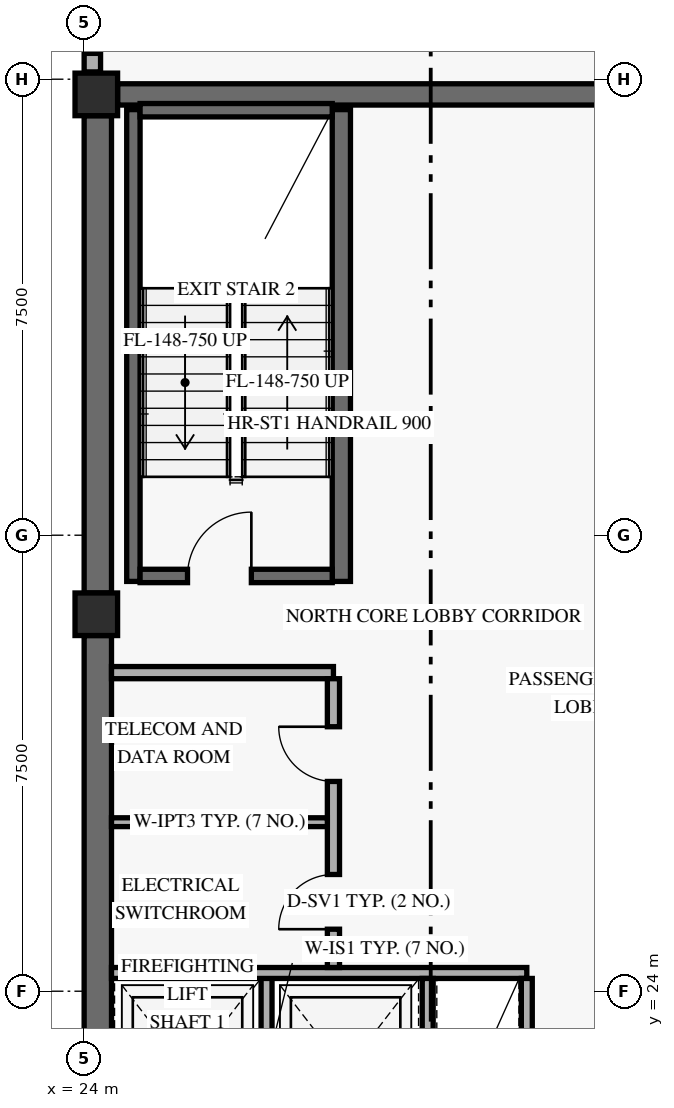
"""IFC4 building model, lengths in metres.
Left out: names, types, materials, properties, quantities, classifications, styles, units other than length and angle.
Written with IfcOpenShell. Run it as: python <this file> out.ifc"""

import sys

from ifc_helpers import new_model, si_unit, direction, frame, frame_2d, origin, origin_2d, place, context, subcontext, project, spatial, rectangle, extrude, element, fill, save


model = new_model("IFC4")
c1 = context("Model", 3, precision=1e-05, world=origin(), true_north=direction((0.0, 1.0)))
c2 = subcontext(c1, "Body", "Model", "MODEL_VIEW")
j1 = project(units=[si_unit("LENGTHUNIT", "METRE"), si_unit("PLANEANGLEUNIT", "RADIAN")], contexts=[c1])
p1 = place(None, origin())
s1 = spatial("IfcSite", under=j1, at=p1, CompositionType="ELEMENT")
p2 = place(p1, origin())
s2 = spatial("IfcBuilding", under=s1, at=p2, CompositionType="ELEMENT")
p3 = place(p2, frame((0.0, 0.0, 231.0)))
s3 = spatial("IfcBuildingStorey", under=s2, at=p3, CompositionType="ELEMENT", Elevation=231.0)
p4 = place(p3, frame((24.225, 17.9, 0.0), z_axis=(0.0, 0.0, 1.0), x_axis=(0.0, 1.0, 0.0)))
e1 = element("IfcWall", 1, at=p4, inside=s3, PredefinedType="SHEAR", context=c2, shape_type="SweptSolid", body=[
    extrude(rectangle(XDim=11.95, YDim=0.45, at=frame_2d((5.975, 0.0))), origin(), (0.0, 0.0, 1.0), 3.421),
])
p5 = place(p3, frame((24.225, 30.55, 0.0), z_axis=(0.0, 0.0, 1.0), x_axis=(0.0, 1.0, 0.0)))
e2 = element("IfcWall", 2, at=p5, inside=s3, PredefinedType="SHEAR", context=c2, shape_type="SweptSolid", body=[
    extrude(rectangle(XDim=7.85, YDim=0.45, at=frame_2d((3.925, 0.0))), origin(), (0.0, 0.0, 1.0), 3.421),
])
p6 = place(p3, frame((24.55, 38.75, 0.0), z_axis=(0.0, 0.0, 1.0), x_axis=(1.0, 0.0, 0.0)))
e3 = element("IfcWall", 3, at=p6, inside=s3, PredefinedType="SHEAR", context=c2, shape_type="SweptSolid", body=[
    extrude(rectangle(XDim=10.3, YDim=0.35, at=frame_2d((5.15, 0.0))), origin(), (0.0, 0.0, 1.0), 3.96),
])
p7 = place(p3, frame((24.81, 30.74, 0.0), z_axis=(0.0, 0.0, 1.0), x_axis=(0.0, 1.0, 0.0)))
e4 = element("IfcWall", 4, at=p7, inside=s3, PredefinedType="SHEAR", context=c2, shape_type="SweptSolid", body=[
    extrude(rectangle(XDim=7.76, YDim=0.22, at=frame_2d((3.88, 0.0))), origin(), (0.0, 0.0, 1.0), 3.96),
])
p8 = place(p3, frame((28.23, 30.74, 0.0), z_axis=(0.0, 0.0, 1.0), x_axis=(0.0, 1.0, 0.0)))
e5 = element("IfcWall", 5, at=p8, inside=s3, PredefinedType="SHEAR", context=c2, shape_type="SweptSolid", body=[
    extrude(rectangle(XDim=7.76, YDim=0.3, at=frame_2d((3.88, 0.0))), origin(), (0.0, 0.0, 1.0), 3.96),
])
p9 = place(p3, frame((24.92, 30.83, 0.0), z_axis=(0.0, 0.0, 1.0), x_axis=(1.0, 0.0, 0.0)))
e6 = element("IfcWall", 6, at=p9, inside=s3, PredefinedType="SHEAR", context=c2, shape_type="SweptSolid", body=[
    extrude(rectangle(XDim=3.16, YDim=0.22, at=frame_2d((1.58, 0.0))), origin(), (0.0, 0.0, 1.0), 3.96),
])
p10 = place(p9, frame((0.78, 0.0, 0.0)))
e7 = element("IfcOpeningElement", 7, at=p10, cuts=e6, PredefinedType="OPENING", context=c2, shape_type="SweptSolid", body=[
    extrude(rectangle(XDim=1.05, YDim=2.15, at=frame_2d((0.525, 1.075))), frame((0.0, 0.12, 0.0), z_axis=(0.0, -1.0, 0.0), x_axis=(1.0, 0.0, 0.0)), (0.0, 0.0, 1.0), 0.24),
])
p11 = place(p3, frame((24.92, 38.49, 0.0), z_axis=(0.0, 0.0, 1.0), x_axis=(1.0, 0.0, 0.0)))
e8 = element("IfcWall", 8, at=p11, inside=s3, PredefinedType="SHEAR", context=c2, shape_type="SweptSolid", body=[
    extrude(rectangle(XDim=3.16, YDim=0.22, at=frame_2d((1.58, 0.0))), origin(), (0.0, 0.0, 1.0), 3.96),
])
for number, where, z_axis, x_axis in (
    (9, (24.2, 30.2, 0.0), (0.0, 0.0, 1.0), (1.0, 0.0, 0.0)),
    (10, (24.2, 38.75, 0.0), (0.0, 0.0, 1.0), (1.0, 0.0, 0.0)),
):
    element("IfcColumn", number, at=place(p3, frame(where, z_axis=z_axis, x_axis=x_axis)), inside=s3, PredefinedType="COLUMN", context=c2, shape_type="SweptSolid", body=[
        extrude(rectangle(XDim=0.7, YDim=0.7, at=origin_2d()), origin(), (0.0, 0.0, 1.0), 4.2),
    ])
p12 = place(p3, frame((24.135, 39.12, 0.0), z_axis=(0.0, 0.0, 1.0), x_axis=(0.0, 1.0, 0.0)))
e11 = element("IfcWall", 11, at=p12, inside=s3, PredefinedType="SOLIDWALL", context=c2, shape_type="SweptSolid", body=[
    extrude(rectangle(XDim=1.56, YDim=0.27, at=frame_2d((0.78, 0.0))), origin(), (0.0, 0.0, 1.0), 3.403),
])
p13 = place(p12, frame((0.305, 0.0, 0.85)))
e12 = element("IfcOpeningElement", 12, at=p13, cuts=e11, PredefinedType="OPENING", context=c2, shape_type="SweptSolid", body=[
    extrude(rectangle(XDim=0.95, YDim=1.5, at=frame_2d((0.475, 0.75))), frame((0.0, 0.145, 0.0), z_axis=(0.0, -1.0, 0.0), x_axis=(1.0, 0.0, 0.0)), (0.0, 0.0, 1.0), 0.29),
])
p14 = place(p3, frame((27.0, 21.19, 0.0), z_axis=(0.0, 0.0, 1.0), x_axis=(0.0, 1.0, 0.0)))
e13 = element("IfcWall", 13, at=p14, inside=s3, PredefinedType="STANDARD", context=c2, shape_type="SweptSolid", body=[
    extrude(rectangle(XDim=3.11, YDim=0.18, at=frame_2d((1.555, 0.0))), origin(), (0.0, 0.0, 1.0), 3.96),
])
p15 = place(p3, frame((24.45, 24.3, 0.0), z_axis=(0.0, 0.0, 1.0), x_axis=(1.0, 0.0, 0.0)))
e14 = element("IfcWall", 14, at=p15, inside=s3, PredefinedType="STANDARD", context=c2, shape_type="SweptSolid", body=[
    extrude(rectangle(XDim=6.83, YDim=0.18, at=frame_2d((3.415, 0.0))), origin(), (0.0, 0.0, 1.0), 3.96),
])
for number, where, z_axis, x_axis in (
    (15, (29.65, 21.19, 0.0), (0.0, 0.0, 1.0), (0.0, 1.0, 0.0)),
    (16, (31.28, 21.19, 0.0), (0.0, 0.0, 1.0), (0.0, 1.0, 0.0)),
):
    element("IfcWall", number, at=place(p3, frame(where, z_axis=z_axis, x_axis=x_axis)), inside=s3, PredefinedType="STANDARD", context=c2, shape_type="SweptSolid", body=[
        extrude(rectangle(XDim=3.02, YDim=0.18, at=frame_2d((1.51, 0.0))), origin(), (0.0, 0.0, 1.0), 3.96),
    ])
p16 = place(p3, frame((24.45, 29.24, 0.0), z_axis=(0.0, 0.0, 1.0), x_axis=(1.0, 0.0, 0.0)))
e17 = element("IfcWall", 17, at=p16, inside=s3, PredefinedType="STANDARD", context=c2, shape_type="SweptSolid", body=[
    extrude(rectangle(XDim=3.65, YDim=0.2, at=frame_2d((1.825, 0.0))), origin(), (0.0, 0.0, 1.0), 3.96),
])
p17 = place(p3, frame((28.1, 24.39, 0.0), z_axis=(0.0, 0.0, 1.0), x_axis=(0.0, 1.0, 0.0)))
e18 = element("IfcWall", 18, at=p17, inside=s3, PredefinedType="STANDARD", context=c2, shape_type="SweptSolid", body=[
    extrude(rectangle(XDim=4.75, YDim=0.2, at=frame_2d((2.375, 0.0))), origin(), (0.0, 0.0, 1.0), 3.96),
])
p18 = place(p17, frame((0.63, 0.0, 0.0)))
e19 = element("IfcOpeningElement", 19, at=p18, cuts=e18, PredefinedType="OPENING", context=c2, shape_type="SweptSolid", body=[
    extrude(rectangle(XDim=0.9, YDim=2.1, at=frame_2d((0.45, 1.05))), frame((0.0, 0.11, 0.0), z_axis=(0.0, -1.0, 0.0), x_axis=(1.0, 0.0, 0.0)), (0.0, 0.0, 1.0), 0.22),
])
p19 = place(p17, frame((3.06, 0.0, 0.0)))
e20 = element("IfcOpeningElement", 20, at=p19, cuts=e18, PredefinedType="OPENING", context=c2, shape_type="SweptSolid", body=[
    extrude(rectangle(XDim=0.9, YDim=2.1, at=frame_2d((0.45, 1.05))), frame((0.0, 0.11, 0.0), z_axis=(0.0, -1.0, 0.0), x_axis=(1.0, 0.0, 0.0)), (0.0, 0.0, 1.0), 0.22),
])
p20 = place(p3, frame((24.45, 26.78, 0.0), z_axis=(0.0, 0.0, 1.0), x_axis=(1.0, 0.0, 0.0)))
e21 = element("IfcWall", 21, at=p20, inside=s3, PredefinedType="PARTITIONING", context=c2, shape_type="SweptSolid", body=[
    extrude(rectangle(XDim=3.55, YDim=0.145, at=frame_2d((1.775, 0.0))), origin(), (0.0, 0.0, 1.0), 3.96),
])
p21 = place(p13, origin())
e22 = element("IfcWindow", 22, at=p21, inside=s3, PartitioningType="SINGLE_PANEL", PredefinedType="WINDOW", context=c2, shape_type="SweptSolid", body=[
    extrude(rectangle(XDim=0.95, YDim=1.5, at=frame_2d((0.475, 0.75))), frame((0.0, 0.03, 0.0), z_axis=(0.0, -1.0, 0.0), x_axis=(1.0, 0.0, 0.0)), (0.0, 0.0, 1.0), 0.06),
])
fill(e12, e22)
p22 = place(p10, origin())
e23 = element("IfcDoor", 23, at=p22, inside=s3, OperationType="SINGLE_SWING_RIGHT", PredefinedType="DOOR", context=c2, shape_type="SweptSolid", body=[
    extrude(rectangle(XDim=1.05, YDim=2.15, at=frame_2d((0.525, 1.075))), frame((0.0, 0.025, 0.0), z_axis=(0.0, -1.0, 0.0), x_axis=(1.0, 0.0, 0.0)), (0.0, 0.0, 1.0), 0.05),
])
fill(e7, e23)
p23 = place(p18, origin())
e24 = element("IfcDoor", 24, at=p23, inside=s3, OperationType="SINGLE_SWING_LEFT", PredefinedType="DOOR", context=c2, shape_type="SweptSolid", body=[
    extrude(rectangle(XDim=0.9, YDim=2.1, at=frame_2d((0.45, 1.05))), frame((0.0, 0.025, 0.0), z_axis=(0.0, -1.0, 0.0), x_axis=(1.0, 0.0, 0.0)), (0.0, 0.0, 1.0), 0.05),
])
fill(e19, e24)
p24 = place(p19, origin())
e25 = element("IfcDoor", 25, at=p24, inside=s3, OperationType="SINGLE_SWING_RIGHT", PredefinedType="DOOR", context=c2, shape_type="SweptSolid", body=[
    extrude(rectangle(XDim=0.9, YDim=2.1, at=frame_2d((0.45, 1.05))), frame((0.0, 0.025, 0.0), z_axis=(0.0, -1.0, 0.0), x_axis=(1.0, 0.0, 0.0)), (0.0, 0.0, 1.0), 0.05),
])
fill(e20, e25)
save(model, sys.argv[1])
